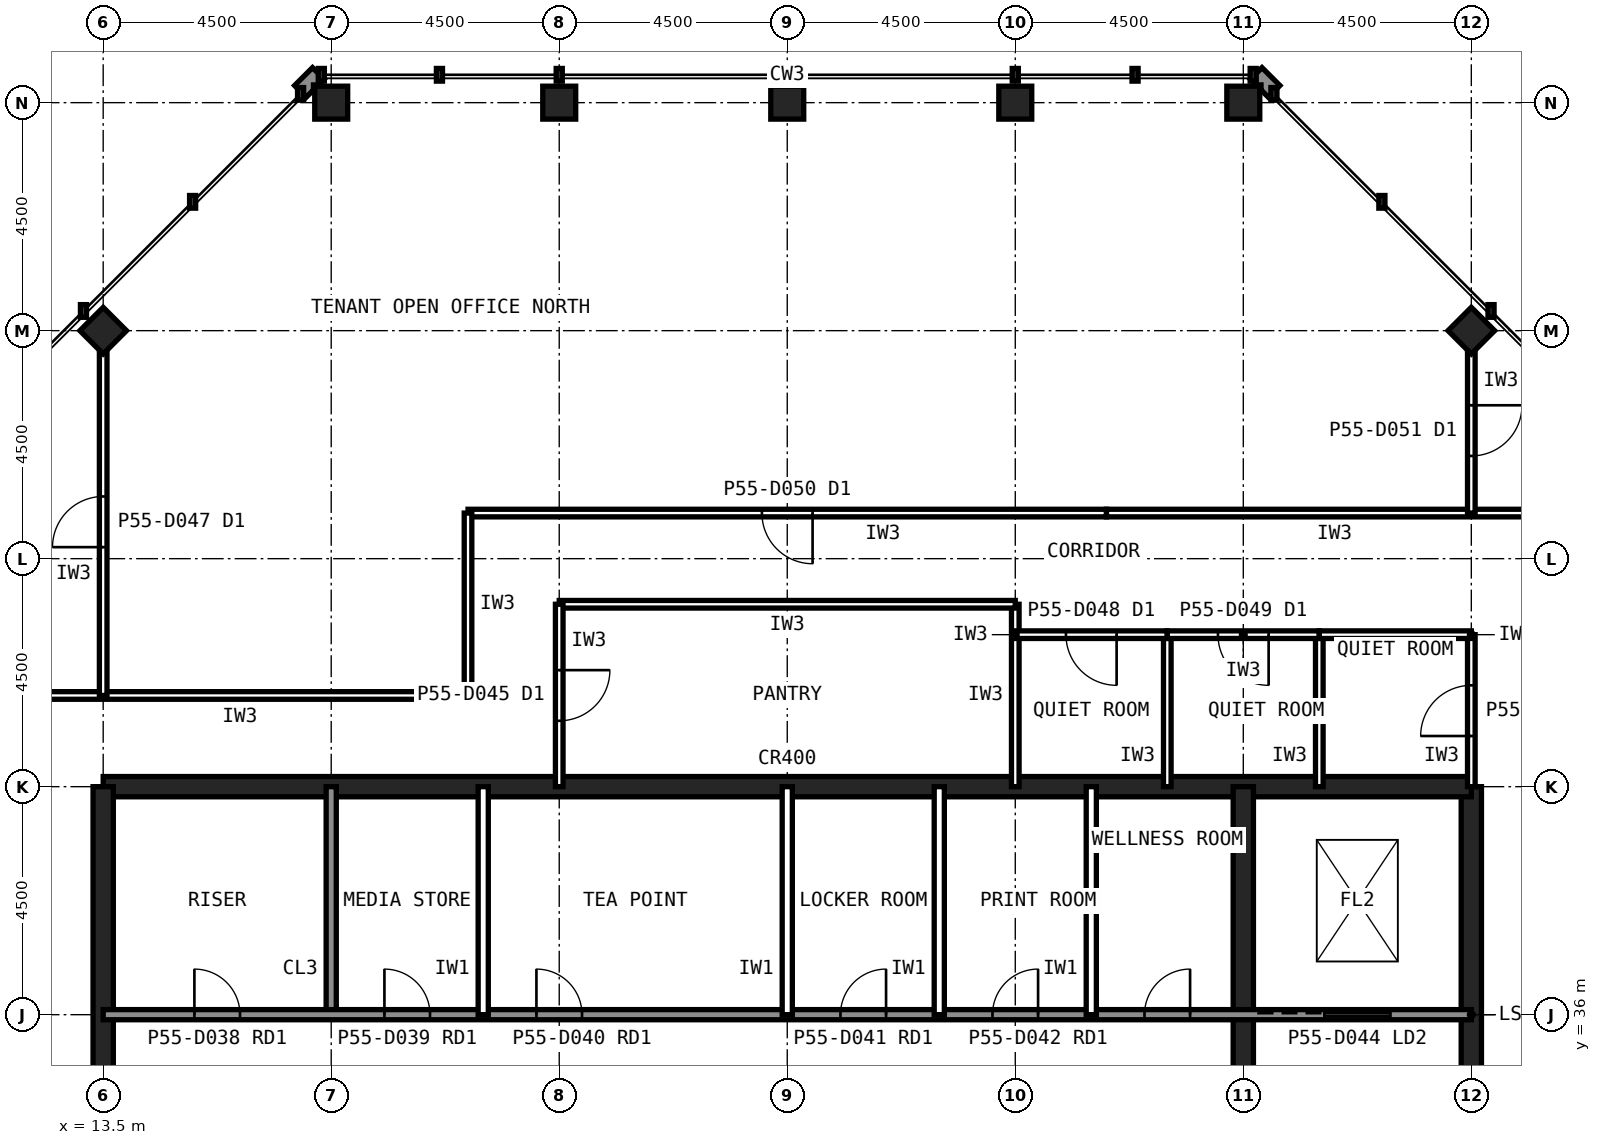
"""IFC4 building model, lengths in metres.
Left out: names, types, materials, properties, quantities, classifications, styles, units other than length and angle.
Written with IfcOpenShell. Run it as: python <this file> out.ifc"""

import sys

from ifc_helpers import new_model, si_unit, direction, frame, frame_2d, origin, origin_2d, place, context, subcontext, project, spatial, rectangle, hollow_rectangle, extrude, element, fill, save


model = new_model("IFC4")
c1 = context("Model", 3, precision=1e-05, world=origin(), true_north=direction((0.0, 1.0)))
c2 = subcontext(c1, "Body", "Model", "MODEL_VIEW")
j1 = project(units=[si_unit("LENGTHUNIT", "METRE"), si_unit("PLANEANGLEUNIT", "RADIAN")], contexts=[c1])
p1 = place(None, origin())
s1 = spatial("IfcSite", under=j1, at=p1, CompositionType="ELEMENT")
p2 = place(p1, origin())
s2 = spatial("IfcBuilding", under=s1, at=p2, CompositionType="ELEMENT")
p3 = place(p2, frame((0.0, 0.0, 230.6)))
s3 = spatial("IfcBuildingStorey", under=s2, at=p3, CompositionType="ELEMENT", Elevation=230.6)
for number, where, z_axis, x_axis in (
    (1, (36.0, 54.0, 0.0), (0.0, 0.0, 1.0), (1.0, 0.0, 0.0)),
    (2, (31.5, 54.0, 0.0), (0.0, 0.0, 1.0), (1.0, 0.0, 0.0)),
    (3, (27.0, 54.0, 0.0), (0.0, 0.0, 1.0), (1.0, 0.0, 0.0)),
    (4, (22.5, 54.0, 0.0), (0.0, 0.0, 1.0), (1.0, 0.0, 0.0)),
    (5, (18.0, 54.0, 0.0), (0.0, 0.0, 1.0), (1.0, 0.0, 0.0)),
    (6, (40.5, 49.5, 0.0), (0.0, 0.0, 1.0), (0.707, 0.707, 0.0)),
    (7, (13.5, 49.5, 0.0), (0.0, 0.0, 1.0), (0.707, 0.707, 0.0)),
):
    element("IfcColumn", number, at=place(p3, frame(where, z_axis=z_axis, x_axis=x_axis)), inside=s3, PredefinedType="COLUMN", context=c2, shape_type="SweptSolid", body=[
        extrude(hollow_rectangle(XDim=0.65, YDim=0.65, WallThickness=0.032, at=origin_2d()), origin(), (0.0, 0.0, 1.0), 4.0),
    ])
p4 = place(p3, frame((40.5, 13.5, 0.0), z_axis=(0.0, 0.0, 1.0), x_axis=(0.0, 1.0, 0.0)))
e8 = element("IfcWall", 8, at=p4, inside=s3, PredefinedType="SHEAR", context=c2, shape_type="SweptSolid", body=[
    extrude(rectangle(XDim=27.0, YDim=0.4, at=frame_2d((13.5, 0.0))), origin(), (0.0, 0.0, 1.0), 4.0),
])
p5 = place(p4, frame((5.85, 0.0, 0.0)))
e9 = element("IfcOpeningElement", 9, at=p5, cuts=e8, PredefinedType="OPENING", context=c2, shape_type="SweptSolid", body=[
    extrude(rectangle(XDim=1.8, YDim=2.1, at=frame_2d((0.9, 1.05))), frame((0.0, 0.21, 0.0), z_axis=(0.0, -1.0, 0.0), x_axis=(1.0, 0.0, 0.0)), (0.0, 0.0, 1.0), 0.42),
])
p6 = place(p4, frame((19.65, 0.0, 0.0)))
e10 = element("IfcOpeningElement", 10, at=p6, cuts=e8, PredefinedType="OPENING", context=c2, shape_type="SweptSolid", body=[
    extrude(rectangle(XDim=1.2, YDim=2.1, at=frame_2d((0.6, 1.05))), frame((0.0, 0.21, 0.0), z_axis=(0.0, -1.0, 0.0), x_axis=(1.0, 0.0, 0.0)), (0.0, 0.0, 1.0), 0.42),
])
p7 = place(p3, frame((40.5, 40.5, 0.0), z_axis=(0.0, 0.0, 1.0), x_axis=(-1.0, 0.0, 0.0)))
e11 = element("IfcWall", 11, at=p7, inside=s3, PredefinedType="SHEAR", context=c2, shape_type="SweptSolid", body=[
    extrude(rectangle(XDim=27.0, YDim=0.4, at=frame_2d((13.5, 0.0))), origin(), (0.0, 0.0, 1.0), 4.0),
])
p8 = place(p3, frame((13.5, 40.5, 0.0), z_axis=(0.0, 0.0, 1.0), x_axis=(0.0, -1.0, 0.0)))
e12 = element("IfcWall", 12, at=p8, inside=s3, PredefinedType="SHEAR", context=c2, shape_type="SweptSolid", body=[
    extrude(rectangle(XDim=27.0, YDim=0.4, at=frame_2d((13.5, 0.0))), origin(), (0.0, 0.0, 1.0), 4.0),
])
p9 = place(p8, frame((19.65, 0.0, 0.0)))
e13 = element("IfcOpeningElement", 13, at=p9, cuts=e12, PredefinedType="OPENING", context=c2, shape_type="SweptSolid", body=[
    extrude(rectangle(XDim=1.2, YDim=2.1, at=frame_2d((0.6, 1.05))), frame((0.0, 0.21, 0.0), z_axis=(0.0, -1.0, 0.0), x_axis=(1.0, 0.0, 0.0)), (0.0, 0.0, 1.0), 0.42),
])
p10 = place(p8, frame((5.85, 0.0, 0.0)))
e14 = element("IfcOpeningElement", 14, at=p10, cuts=e12, PredefinedType="OPENING", context=c2, shape_type="SweptSolid", body=[
    extrude(rectangle(XDim=1.8, YDim=2.1, at=frame_2d((0.9, 1.05))), frame((0.0, 0.21, 0.0), z_axis=(0.0, -1.0, 0.0), x_axis=(1.0, 0.0, 0.0)), (0.0, 0.0, 1.0), 0.42),
])
p11 = place(p3, frame((18.0, 36.0, 0.0), z_axis=(0.0, 0.0, 1.0), x_axis=(0.0, 1.0, 0.0)))
e15 = element("IfcWall", 15, at=p11, inside=s3, PredefinedType="SOLIDWALL", context=c2, shape_type="SweptSolid", body=[
    extrude(rectangle(XDim=4.5, YDim=0.2, at=frame_2d((2.25, 0.0))), origin(), (0.0, 0.0, 1.0), 3.84),
])
p12 = place(p3, frame((36.0, 22.5, 0.0), z_axis=(0.0, 0.0, 1.0), x_axis=(0.0, 1.0, 0.0)))
e16 = element("IfcWall", 16, at=p12, inside=s3, PredefinedType="SHEAR", context=c2, shape_type="SweptSolid", body=[
    extrude(rectangle(XDim=18.0, YDim=0.4, at=frame_2d((9.0, 0.0))), origin(), (0.0, 0.0, 1.0), 4.0),
])
p13 = place(p3, frame((13.5, 36.0, 0.0), z_axis=(0.0, 0.0, 1.0), x_axis=(1.0, 0.0, 0.0)))
e17 = element("IfcWall", 17, at=p13, inside=s3, PredefinedType="SOLIDWALL", context=c2, shape_type="SweptSolid", body=[
    extrude(rectangle(XDim=27.0, YDim=0.2, at=frame_2d((13.5, 0.0))), origin(), (0.0, 0.0, 1.0), 3.84),
])
p14 = place(p13, frame((1.8, 0.0, 0.0)))
e18 = element("IfcOpeningElement", 18, at=p14, cuts=e17, PredefinedType="OPENING", context=c2, shape_type="SweptSolid", body=[
    extrude(rectangle(XDim=0.9, YDim=2.1, at=frame_2d((0.45, 1.05))), frame((0.0, 0.11, 0.0), z_axis=(0.0, -1.0, 0.0), x_axis=(1.0, 0.0, 0.0)), (0.0, 0.0, 1.0), 0.22),
])
p15 = place(p13, frame((5.55, 0.0, 0.0)))
e19 = element("IfcOpeningElement", 19, at=p15, cuts=e17, PredefinedType="OPENING", context=c2, shape_type="SweptSolid", body=[
    extrude(rectangle(XDim=0.9, YDim=2.1, at=frame_2d((0.45, 1.05))), frame((0.0, 0.11, 0.0), z_axis=(0.0, -1.0, 0.0), x_axis=(1.0, 0.0, 0.0)), (0.0, 0.0, 1.0), 0.22),
])
p16 = place(p13, frame((11.55, 0.0, 0.0)))
e20 = element("IfcOpeningElement", 20, at=p16, cuts=e17, PredefinedType="OPENING", context=c2, shape_type="SweptSolid", body=[
    extrude(rectangle(XDim=0.9, YDim=2.1, at=frame_2d((0.45, 1.05))), frame((0.0, 0.11, 0.0), z_axis=(0.0, -1.0, 0.0), x_axis=(1.0, 0.0, 0.0)), (0.0, 0.0, 1.0), 0.22),
])
p17 = place(p13, frame((14.55, 0.0, 0.0)))
e21 = element("IfcOpeningElement", 21, at=p17, cuts=e17, PredefinedType="OPENING", context=c2, shape_type="SweptSolid", body=[
    extrude(rectangle(XDim=0.9, YDim=2.1, at=frame_2d((0.45, 1.05))), frame((0.0, 0.11, 0.0), z_axis=(0.0, -1.0, 0.0), x_axis=(1.0, 0.0, 0.0)), (0.0, 0.0, 1.0), 0.22),
])
p18 = place(p13, frame((24.1, 0.0, 0.0)))
e22 = element("IfcOpeningElement", 22, at=p18, cuts=e17, PredefinedType="OPENING", context=c2, shape_type="SweptSolid", body=[
    extrude(rectangle(XDim=1.3, YDim=2.2, at=frame_2d((0.65, 1.1))), frame((0.0, 0.11, 0.0), z_axis=(0.0, -1.0, 0.0), x_axis=(1.0, 0.0, 0.0)), (0.0, 0.0, 1.0), 0.22),
])
for number, where, z_axis, x_axis in (
    (23, (24.0, 36.0, 0.0), (0.0, 0.0, 1.0), (0.0, 1.0, 0.0)),
    (24, (27.0, 36.0, 0.0), (0.0, 0.0, 1.0), (0.0, 1.0, 0.0)),
):
    element("IfcWall", number, at=place(p3, frame(where, z_axis=z_axis, x_axis=x_axis)), inside=s3, PredefinedType="PARTITIONING", context=c2, shape_type="SweptSolid", body=[
        extrude(rectangle(XDim=4.5, YDim=0.2, at=frame_2d((2.25, 0.0))), origin(), (0.0, 0.0, 1.0), 3.84),
    ])
p19 = place(p3, frame((33.3, 45.9, 0.0), z_axis=(0.0, 0.0, 1.0), x_axis=(-1.0, 0.0, 0.0)))
e25 = element("IfcWall", 25, at=p19, inside=s3, PredefinedType="PARTITIONING", context=c2, shape_type="SweptSolid", body=[
    extrude(rectangle(XDim=12.6, YDim=0.15, at=frame_2d((6.3, 0.0))), origin(), (0.0, 0.0, 1.0), 3.84),
])
p20 = place(p19, frame((5.8, 0.0, 0.0)))
e26 = element("IfcOpeningElement", 26, at=p20, cuts=e25, PredefinedType="OPENING", context=c2, shape_type="SweptSolid", body=[
    extrude(rectangle(XDim=1.0, YDim=2.1, at=frame_2d((0.5, 1.05))), frame((0.0, 0.085, 0.0), z_axis=(0.0, -1.0, 0.0), x_axis=(1.0, 0.0, 0.0)), (0.0, 0.0, 1.0), 0.17),
])
for number, where, z_axis, x_axis in (
    (27, (20.7, 42.3, 0.0), (0.0, 0.0, 1.0), (-1.0, 0.0, 0.0)),
    (28, (42.3, 45.9, 0.0), (0.0, 0.0, 1.0), (-1.0, 0.0, 0.0)),
):
    element("IfcWall", number, at=place(p3, frame(where, z_axis=z_axis, x_axis=x_axis)), inside=s3, PredefinedType="PARTITIONING", context=c2, shape_type="SweptSolid", body=[
        extrude(rectangle(XDim=9.0, YDim=0.15, at=frame_2d((4.5, 0.0))), origin(), (0.0, 0.0, 1.0), 3.84),
    ])
p21 = place(p3, frame((20.7, 45.9, 0.0), z_axis=(0.0, 0.0, 1.0), x_axis=(0.0, -1.0, 0.0)))
e29 = element("IfcWall", 29, at=p21, inside=s3, PredefinedType="PARTITIONING", context=c2, shape_type="SweptSolid", body=[
    extrude(rectangle(XDim=3.6, YDim=0.15, at=frame_2d((1.8, 0.0))), origin(), (0.0, 0.0, 1.0), 3.84),
])
p22 = place(p3, frame((31.5, 40.5, 0.0), z_axis=(0.0, 0.0, 1.0), x_axis=(0.0, 1.0, 0.0)))
e30 = element("IfcWall", 30, at=p22, inside=s3, PredefinedType="PARTITIONING", context=c2, shape_type="SweptSolid", body=[
    extrude(rectangle(XDim=3.6, YDim=0.15, at=frame_2d((1.8, 0.0))), origin(), (0.0, 0.0, 1.0), 2.989),
])
p23 = place(p3, frame((31.5, 44.1, 0.0), z_axis=(0.0, 0.0, 1.0), x_axis=(-1.0, 0.0, 0.0)))
e31 = element("IfcWall", 31, at=p23, inside=s3, PredefinedType="PARTITIONING", context=c2, shape_type="SweptSolid", body=[
    extrude(rectangle(XDim=9.0, YDim=0.15, at=frame_2d((4.5, 0.0))), origin(), (0.0, 0.0, 1.0), 3.84),
])
p24 = place(p3, frame((22.5, 44.1, 0.0), z_axis=(0.0, 0.0, 1.0), x_axis=(0.0, -1.0, 0.0)))
e32 = element("IfcWall", 32, at=p24, inside=s3, PredefinedType="PARTITIONING", context=c2, shape_type="SweptSolid", body=[
    extrude(rectangle(XDim=3.6, YDim=0.15, at=frame_2d((1.8, 0.0))), origin(), (0.0, 0.0, 1.0), 2.989),
])
p25 = place(p24, frame((1.3, 0.0, 0.0)))
e33 = element("IfcOpeningElement", 33, at=p25, cuts=e32, PredefinedType="OPENING", context=c2, shape_type="SweptSolid", body=[
    extrude(rectangle(XDim=1.0, YDim=2.1, at=frame_2d((0.5, 1.05))), frame((0.0, 0.085, 0.0), z_axis=(0.0, -1.0, 0.0), x_axis=(1.0, 0.0, 0.0)), (0.0, 0.0, 1.0), 0.17),
])
p26 = place(p3, frame((34.5, 40.5, 0.0), z_axis=(0.0, 0.0, 1.0), x_axis=(0.0, 1.0, 0.0)))
e34 = element("IfcWall", 34, at=p26, inside=s3, PredefinedType="PARTITIONING", context=c2, shape_type="SweptSolid", body=[
    extrude(rectangle(XDim=3.0, YDim=0.15, at=frame_2d((1.5, 0.0))), origin(), (0.0, 0.0, 1.0), 3.84),
])
p27 = place(p3, frame((34.5, 43.5, 0.0), z_axis=(0.0, 0.0, 1.0), x_axis=(-1.0, 0.0, 0.0)))
e35 = element("IfcWall", 35, at=p27, inside=s3, PredefinedType="PARTITIONING", context=c2, shape_type="SweptSolid", body=[
    extrude(rectangle(XDim=3.0, YDim=0.15, at=frame_2d((1.5, 0.0))), origin(), (0.0, 0.0, 1.0), 3.84),
])
p28 = place(p27, frame((1.0, 0.0, 0.0)))
e36 = element("IfcOpeningElement", 36, at=p28, cuts=e35, PredefinedType="OPENING", context=c2, shape_type="SweptSolid", body=[
    extrude(rectangle(XDim=1.0, YDim=2.1, at=frame_2d((0.5, 1.05))), frame((0.0, 0.085, 0.0), z_axis=(0.0, -1.0, 0.0), x_axis=(1.0, 0.0, 0.0)), (0.0, 0.0, 1.0), 0.17),
])
p29 = place(p3, frame((37.5, 40.5, 0.0), z_axis=(0.0, 0.0, 1.0), x_axis=(0.0, 1.0, 0.0)))
e37 = element("IfcWall", 37, at=p29, inside=s3, PredefinedType="PARTITIONING", context=c2, shape_type="SweptSolid", body=[
    extrude(rectangle(XDim=3.0, YDim=0.15, at=frame_2d((1.5, 0.0))), origin(), (0.0, 0.0, 1.0), 3.84),
])
p30 = place(p3, frame((37.5, 43.5, 0.0), z_axis=(0.0, 0.0, 1.0), x_axis=(-1.0, 0.0, 0.0)))
e38 = element("IfcWall", 38, at=p30, inside=s3, PredefinedType="PARTITIONING", context=c2, shape_type="SweptSolid", body=[
    extrude(rectangle(XDim=3.0, YDim=0.15, at=frame_2d((1.5, 0.0))), origin(), (0.0, 0.0, 1.0), 3.84),
])
p31 = place(p30, frame((1.0, 0.0, 0.0)))
e39 = element("IfcOpeningElement", 39, at=p31, cuts=e38, PredefinedType="OPENING", context=c2, shape_type="SweptSolid", body=[
    extrude(rectangle(XDim=1.0, YDim=2.1, at=frame_2d((0.5, 1.05))), frame((0.0, 0.085, 0.0), z_axis=(0.0, -1.0, 0.0), x_axis=(1.0, 0.0, 0.0)), (0.0, 0.0, 1.0), 0.17),
])
p32 = place(p3, frame((40.5, 40.5, 0.0), z_axis=(0.0, 0.0, 1.0), x_axis=(0.0, 1.0, 0.0)))
e40 = element("IfcWall", 40, at=p32, inside=s3, PredefinedType="PARTITIONING", context=c2, shape_type="SweptSolid", body=[
    extrude(rectangle(XDim=3.0, YDim=0.15, at=frame_2d((1.5, 0.0))), origin(), (0.0, 0.0, 1.0), 2.989),
])
p33 = place(p32, frame((1.0, 0.0, 0.0)))
e41 = element("IfcOpeningElement", 41, at=p33, cuts=e40, PredefinedType="OPENING", context=c2, shape_type="SweptSolid", body=[
    extrude(rectangle(XDim=1.0, YDim=2.1, at=frame_2d((0.5, 1.05))), frame((0.0, 0.085, 0.0), z_axis=(0.0, -1.0, 0.0), x_axis=(1.0, 0.0, 0.0)), (0.0, 0.0, 1.0), 0.17),
])
p34 = place(p3, frame((40.5, 43.5, 0.0), z_axis=(0.0, 0.0, 1.0), x_axis=(-1.0, 0.0, 0.0)))
e42 = element("IfcWall", 42, at=p34, inside=s3, PredefinedType="PARTITIONING", context=c2, shape_type="SweptSolid", body=[
    extrude(rectangle(XDim=3.0, YDim=0.15, at=frame_2d((1.5, 0.0))), origin(), (0.0, 0.0, 1.0), 3.84),
])
p35 = place(p3, frame((40.5, 49.155, 0.0), z_axis=(0.0, 0.0, 1.0), x_axis=(0.0, -1.0, 0.0)))
e43 = element("IfcWall", 43, at=p35, inside=s3, PredefinedType="PARTITIONING", context=c2, shape_type="SweptSolid", body=[
    extrude(rectangle(XDim=3.255, YDim=0.15, at=frame_2d((1.627, 0.0))), origin(), (0.0, 0.0, 1.0), 2.989),
])
p36 = place(p35, frame((1.127, 0.0, 0.0)))
e44 = element("IfcOpeningElement", 44, at=p36, cuts=e43, PredefinedType="OPENING", context=c2, shape_type="SweptSolid", body=[
    extrude(rectangle(XDim=1.0, YDim=2.1, at=frame_2d((0.5, 1.05))), frame((0.0, 0.085, 0.0), z_axis=(0.0, -1.0, 0.0), x_axis=(1.0, 0.0, 0.0)), (0.0, 0.0, 1.0), 0.17),
])
p37 = place(p3, frame((13.5, 42.3, 0.0), z_axis=(0.0, 0.0, 1.0), x_axis=(0.0, 1.0, 0.0)))
e45 = element("IfcWall", 45, at=p37, inside=s3, PredefinedType="PARTITIONING", context=c2, shape_type="SweptSolid", body=[
    extrude(rectangle(XDim=6.855, YDim=0.15, at=frame_2d((3.427, 0.0))), origin(), (0.0, 0.0, 1.0), 2.989),
])
p38 = place(p37, frame((2.927, 0.0, 0.0)))
e46 = element("IfcOpeningElement", 46, at=p38, cuts=e45, PredefinedType="OPENING", context=c2, shape_type="SweptSolid", body=[
    extrude(rectangle(XDim=1.0, YDim=2.1, at=frame_2d((0.5, 1.05))), frame((0.0, 0.085, 0.0), z_axis=(0.0, -1.0, 0.0), x_axis=(1.0, 0.0, 0.0)), (0.0, 0.0, 1.0), 0.17),
])
p39 = place(p14, origin())
e47 = element("IfcDoor", 47, at=p39, inside=s3, OperationType="SINGLE_SWING_LEFT", PredefinedType="DOOR", context=c2, shape_type="SweptSolid", body=[
    extrude(rectangle(XDim=0.9, YDim=2.1, at=frame_2d((0.45, 1.05))), frame((0.0, 0.025, 0.0), z_axis=(0.0, -1.0, 0.0), x_axis=(1.0, 0.0, 0.0)), (0.0, 0.0, 1.0), 0.05),
])
fill(e18, e47)
p40 = place(p15, origin())
e48 = element("IfcDoor", 48, at=p40, inside=s3, OperationType="SINGLE_SWING_LEFT", PredefinedType="DOOR", context=c2, shape_type="SweptSolid", body=[
    extrude(rectangle(XDim=0.9, YDim=2.1, at=frame_2d((0.45, 1.05))), frame((0.0, 0.025, 0.0), z_axis=(0.0, -1.0, 0.0), x_axis=(1.0, 0.0, 0.0)), (0.0, 0.0, 1.0), 0.05),
])
fill(e19, e48)
p41 = place(p16, origin())
e49 = element("IfcDoor", 49, at=p41, inside=s3, OperationType="SINGLE_SWING_LEFT", PredefinedType="DOOR", context=c2, shape_type="SweptSolid", body=[
    extrude(rectangle(XDim=0.9, YDim=2.1, at=frame_2d((0.45, 1.05))), frame((0.0, 0.025, 0.0), z_axis=(0.0, -1.0, 0.0), x_axis=(1.0, 0.0, 0.0)), (0.0, 0.0, 1.0), 0.05),
])
fill(e20, e49)
p42 = place(p17, origin())
e50 = element("IfcDoor", 50, at=p42, inside=s3, OperationType="SINGLE_SWING_RIGHT", PredefinedType="DOOR", context=c2, shape_type="SweptSolid", body=[
    extrude(rectangle(XDim=0.9, YDim=2.1, at=frame_2d((0.45, 1.05))), frame((0.0, 0.025, 0.0), z_axis=(0.0, -1.0, 0.0), x_axis=(1.0, 0.0, 0.0)), (0.0, 0.0, 1.0), 0.05),
])
fill(e21, e50)
p43 = place(p18, origin())
e51 = element("IfcDoor", 51, at=p43, inside=s3, OperationType="SLIDING_TO_LEFT", PredefinedType="DOOR", context=c2, shape_type="SweptSolid", body=[
    extrude(rectangle(XDim=1.3, YDim=2.2, at=frame_2d((0.65, 1.1))), frame((0.0, 0.025, 0.0), z_axis=(0.0, -1.0, 0.0), x_axis=(1.0, 0.0, 0.0)), (0.0, 0.0, 1.0), 0.05),
])
fill(e22, e51)
p44 = place(p20, origin())
e52 = element("IfcDoor", 52, at=p44, inside=s3, OperationType="SINGLE_SWING_LEFT", PredefinedType="DOOR", context=c2, shape_type="SweptSolid", body=[
    extrude(rectangle(XDim=1.0, YDim=2.1, at=frame_2d((0.5, 1.05))), frame((0.0, 0.025, 0.0), z_axis=(0.0, -1.0, 0.0), x_axis=(1.0, 0.0, 0.0)), (0.0, 0.0, 1.0), 0.05),
])
fill(e26, e52)
p45 = place(p25, origin())
e53 = element("IfcDoor", 53, at=p45, inside=s3, OperationType="SINGLE_SWING_LEFT", PredefinedType="DOOR", context=c2, shape_type="SweptSolid", body=[
    extrude(rectangle(XDim=1.0, YDim=2.1, at=frame_2d((0.5, 1.05))), frame((0.0, 0.025, 0.0), z_axis=(0.0, -1.0, 0.0), x_axis=(1.0, 0.0, 0.0)), (0.0, 0.0, 1.0), 0.05),
])
fill(e33, e53)
p46 = place(p28, origin())
e54 = element("IfcDoor", 54, at=p46, inside=s3, OperationType="SINGLE_SWING_LEFT", PredefinedType="DOOR", context=c2, shape_type="SweptSolid", body=[
    extrude(rectangle(XDim=1.0, YDim=2.1, at=frame_2d((0.5, 1.05))), frame((0.0, 0.025, 0.0), z_axis=(0.0, -1.0, 0.0), x_axis=(1.0, 0.0, 0.0)), (0.0, 0.0, 1.0), 0.05),
])
fill(e36, e54)
p47 = place(p31, origin())
e55 = element("IfcDoor", 55, at=p47, inside=s3, OperationType="SINGLE_SWING_LEFT", PredefinedType="DOOR", context=c2, shape_type="SweptSolid", body=[
    extrude(rectangle(XDim=1.0, YDim=2.1, at=frame_2d((0.5, 1.05))), frame((0.0, 0.025, 0.0), z_axis=(0.0, -1.0, 0.0), x_axis=(1.0, 0.0, 0.0)), (0.0, 0.0, 1.0), 0.05),
])
fill(e39, e55)
p48 = place(p33, origin())
e56 = element("IfcDoor", 56, at=p48, inside=s3, OperationType="SINGLE_SWING_LEFT", PredefinedType="DOOR", context=c2, shape_type="SweptSolid", body=[
    extrude(rectangle(XDim=1.0, YDim=2.1, at=frame_2d((0.5, 1.05))), frame((0.0, 0.025, 0.0), z_axis=(0.0, -1.0, 0.0), x_axis=(1.0, 0.0, 0.0)), (0.0, 0.0, 1.0), 0.05),
])
fill(e41, e56)
p49 = place(p36, origin())
e57 = element("IfcDoor", 57, at=p49, inside=s3, OperationType="SINGLE_SWING_LEFT", PredefinedType="DOOR", context=c2, shape_type="SweptSolid", body=[
    extrude(rectangle(XDim=1.0, YDim=2.1, at=frame_2d((0.5, 1.05))), frame((0.0, 0.025, 0.0), z_axis=(0.0, -1.0, 0.0), x_axis=(1.0, 0.0, 0.0)), (0.0, 0.0, 1.0), 0.05),
])
fill(e44, e57)
p50 = place(p38, origin())
e58 = element("IfcDoor", 58, at=p50, inside=s3, OperationType="SINGLE_SWING_LEFT", PredefinedType="DOOR", context=c2, shape_type="SweptSolid", body=[
    extrude(rectangle(XDim=1.0, YDim=2.1, at=frame_2d((0.5, 1.05))), frame((0.0, 0.025, 0.0), z_axis=(0.0, -1.0, 0.0), x_axis=(1.0, 0.0, 0.0)), (0.0, 0.0, 1.0), 0.05),
])
fill(e46, e58)
save(model, sys.argv[1])
